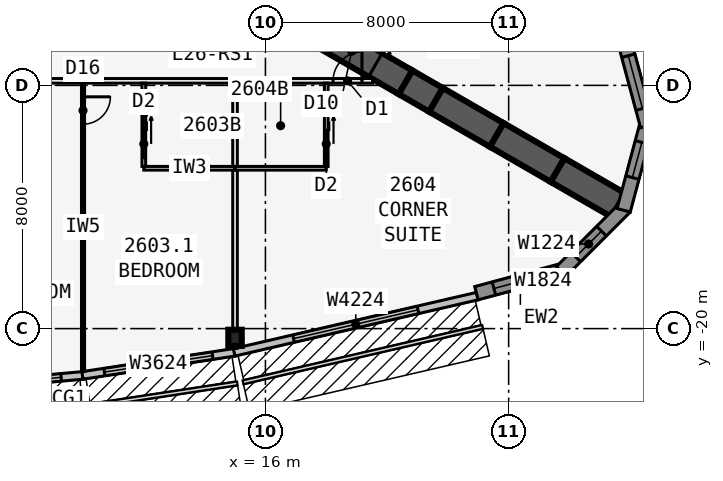
"""IFC4 building model, lengths in metres.
Left out: names, types, materials, properties, quantities, classifications, styles, units other than length and angle.
Written with IfcOpenShell. Run it as: python <this file> out.ifc"""

import sys

from ifc_helpers import new_model, si_unit, direction, frame, frame_2d, origin, origin_2d, place, context, subcontext, project, spatial, polyline, rectangle, i_section, outline, extrude, element, fill, save


model = new_model("IFC4")
c1 = context("Model", 3, precision=1e-05, world=origin(), true_north=direction((0.0, 1.0)))
c2 = subcontext(c1, "Body", "Model", "MODEL_VIEW")
j1 = project(units=[si_unit("LENGTHUNIT", "METRE"), si_unit("PLANEANGLEUNIT", "RADIAN")], contexts=[c1])
p1 = place(None, origin())
s1 = spatial("IfcSite", under=j1, at=p1, CompositionType="ELEMENT")
p2 = place(p1, origin())
s2 = spatial("IfcBuilding", under=s1, at=p2, CompositionType="ELEMENT")
p3 = place(p2, frame((0.0, 0.0, 99.9)))
s3 = spatial("IfcBuildingStorey", under=s2, at=p3, CompositionType="ELEMENT", Elevation=99.9)
p4 = place(p3, frame((16.5, -9.526, 0.0), z_axis=(0.0, 0.0, 1.0), x_axis=(0.866031398331, -0.499989616998, 0.0)))
e1 = element("IfcWall", 1, at=p4, inside=s3, PredefinedType="SHEAR", context=c2, shape_type="SweptSolid", body=[
    extrude(rectangle(XDim=4.746, YDim=0.9, at=frame_2d((2.373, 0.0))), origin(), (0.0, 0.0, 1.0), 3.4),
])
p5 = place(p4, frame((1.8, 0.0, 0.0)))
e2 = element("IfcOpeningElement", 2, at=p5, cuts=e1, PredefinedType="OPENING", context=c2, shape_type="SweptSolid", body=[
    extrude(rectangle(XDim=1.8, YDim=2.13, at=frame_2d((0.9, 1.065))), frame((0.0, 0.46, 0.0), z_axis=(0.0, -1.0, 0.0), x_axis=(1.0, 0.0, 0.0)), (0.0, 0.0, 1.0), 0.92),
])
p6 = place(p3, frame((20.61, -11.899, 0.0), z_axis=(0.0, 0.0, 1.0), x_axis=(0.866009537788, -0.500027479704, 0.0)))
e3 = element("IfcWall", 3, at=p6, inside=s3, PredefinedType="SHEAR", context=c2, shape_type="SweptSolid", body=[
    extrude(rectangle(XDim=1.155, YDim=0.9, at=frame_2d((0.577, 0.0))), origin(), (0.0, 0.0, 1.0), 3.4),
])
for number, where, z_axis, x_axis in (
    (4, (21.61, -12.477, 0.0), (0.0, 0.0, 1.0), (0.866, -0.5, 0.0)),
    (5, (23.61, -13.631, 0.0), (0.0, 0.0, 1.0), (0.866, -0.5, 0.0)),
    (6, (25.61, -14.786, 0.0), (0.0, 0.0, 1.0), (0.866, -0.5, 0.0)),
):
    element("IfcWall", number, at=place(p3, frame(where, z_axis=z_axis, x_axis=x_axis)), inside=s3, PredefinedType="SHEAR", context=c2, shape_type="SweptSolid", body=[
        extrude(rectangle(XDim=2.309, YDim=0.9, at=frame_2d((1.155, 0.0))), origin(), (0.0, 0.0, 1.0), 3.4),
    ])
p7 = place(p3, frame((15.0, -20.303, 0.0), z_axis=(0.0, 0.0, 1.0), x_axis=(1.0, 0.0, 0.0)))
e7 = element("IfcColumn", 7, at=p7, inside=s3, PredefinedType="COLUMN", context=c2, shape_type="SweptSolid", body=[
    extrude(i_section(OverallWidth=0.442, OverallDepth=0.531, WebThickness=0.066, FlangeThickness=0.106, at=origin_2d()), origin(), (0.0, 0.0, 1.0), 3.4),
])
p8 = place(p3, frame((4.989, -21.996, 0.0), z_axis=(0.0, 0.0, 1.0), x_axis=(0.995857256774, 0.090930325692, 0.0)))
e8 = element("IfcWall", 8, at=p8, inside=s3, PredefinedType="STANDARD", context=c2, shape_type="SweptSolid", body=[
    extrude(rectangle(XDim=5.021, YDim=0.25, at=frame_2d((2.51, 0.0))), origin(), (0.0, 0.0, 1.0), 3.15),
])
p9 = place(p8, frame((0.71, 0.0, 0.45)))
e9 = element("IfcOpeningElement", 9, at=p9, cuts=e8, PredefinedType="OPENING", context=c2, shape_type="SweptSolid", body=[
    extrude(rectangle(XDim=3.6, YDim=2.4, at=frame_2d((1.8, 1.2))), frame((0.0, 0.135, 0.0), z_axis=(0.0, -1.0, 0.0), x_axis=(1.0, 0.0, 0.0)), (0.0, 0.0, 1.0), 0.27),
])
p10 = place(p3, frame((9.981, -21.54, 0.0), z_axis=(0.0, 0.0, 1.0), x_axis=(0.988615403399, 0.150464561152, 0.0)))
e10 = element("IfcWall", 10, at=p10, inside=s3, PredefinedType="STANDARD", context=c2, shape_type="SweptSolid", body=[
    extrude(rectangle(XDim=5.058, YDim=0.25, at=frame_2d((2.529, 0.0))), origin(), (0.0, 0.0, 1.0), 3.15),
])
p11 = place(p10, frame((0.729, 0.0, 0.45)))
e11 = element("IfcOpeningElement", 11, at=p11, cuts=e10, PredefinedType="OPENING", context=c2, shape_type="SweptSolid", body=[
    extrude(rectangle(XDim=3.6, YDim=2.4, at=frame_2d((1.8, 1.2))), frame((0.0, 0.135, 0.0), z_axis=(0.0, -1.0, 0.0), x_axis=(1.0, 0.0, 0.0)), (0.0, 0.0, 1.0), 0.27),
])
p12 = place(p3, frame((14.972, -20.781, 0.0), z_axis=(0.0, 0.0, 1.0), x_axis=(0.974279327392, 0.225343720163, 0.0)))
e12 = element("IfcWall", 12, at=p12, inside=s3, PredefinedType="STANDARD", context=c2, shape_type="SweptSolid", body=[
    extrude(rectangle(XDim=8.211, YDim=0.25, at=frame_2d((4.105, 0.0))), origin(), (0.0, 0.0, 1.0), 3.15),
])
p13 = place(p12, frame((2.006, 0.0, 0.45)))
e13 = element("IfcOpeningElement", 13, at=p13, cuts=e12, PredefinedType="OPENING", context=c2, shape_type="SweptSolid", body=[
    extrude(rectangle(XDim=4.2, YDim=2.4, at=frame_2d((2.1, 1.2))), frame((0.0, 0.135, 0.0), z_axis=(0.0, -1.0, 0.0), x_axis=(1.0, 0.0, 0.0)), (0.0, 0.0, 1.0), 0.27),
])
p14 = place(p3, frame((22.942, -18.835, 0.0), z_axis=(0.0, 0.0, 1.0), x_axis=(0.965930548995, 0.258801419081, 0.0)))
e14 = element("IfcWall", 14, at=p14, inside=s3, PredefinedType="SOLIDWALL", context=c2, shape_type="SweptSolid", body=[
    extrude(rectangle(XDim=2.989, YDim=0.45, at=frame_2d((1.494, 0.0))), origin(), (0.0, 0.0, 1.0), 3.15),
])
p15 = place(p14, frame((0.594, 0.0, 0.45)))
e15 = element("IfcOpeningElement", 15, at=p15, cuts=e14, PredefinedType="OPENING", context=c2, shape_type="SweptSolid", body=[
    extrude(rectangle(XDim=1.8, YDim=2.4, at=frame_2d((0.9, 1.2))), frame((0.0, 0.235, 0.0), z_axis=(0.0, -1.0, 0.0), x_axis=(1.0, 0.0, 0.0)), (0.0, 0.0, 1.0), 0.47),
])
p16 = place(p3, frame((25.728, -18.12, 0.0), z_axis=(0.0, 0.0, 1.0), x_axis=(0.707025086683, 0.707188466253, 0.0)))
e16 = element("IfcWall", 16, at=p16, inside=s3, PredefinedType="SOLIDWALL", context=c2, shape_type="SweptSolid", body=[
    extrude(outline(polyline([(2.989, 0.225), (2.93, 0.225), (2.438, 0.093), (2.402, 0.225), (0.0, 0.225), (0.0, -0.225), (2.989, -0.225), (2.989, 0.225)])), origin(), (0.0, 0.0, 1.0), 3.15),
])
p17 = place(p16, frame((0.676, 0.0, 0.45)))
e17 = element("IfcOpeningElement", 17, at=p17, cuts=e16, PredefinedType="OPENING", context=c2, shape_type="SweptSolid", body=[
    extrude(rectangle(XDim=1.2, YDim=2.4, at=frame_2d((0.6, 1.2))), frame((0.0, 0.235, 0.0), z_axis=(0.0, -1.0, 0.0), x_axis=(1.0, 0.0, 0.0)), (0.0, 0.0, 1.0), 0.47),
])
p18 = place(p3, frame((27.783, -16.108, 0.0), z_axis=(0.0, 0.0, 1.0), x_axis=(0.258801419081, 0.965930548995, 0.0)))
e18 = element("IfcWall", 18, at=p18, inside=s3, PredefinedType="SOLIDWALL", context=c2, shape_type="SweptSolid", body=[
    extrude(outline(polyline([(2.989, 0.225), (0.586, 0.225), (0.551, 0.093), (0.06, 0.225), (0.0, 0.225), (0.0, -0.225), (2.989, -0.225), (2.989, 0.225)])), origin(), (0.0, 0.0, 1.0), 3.15),
])
p19 = place(p18, frame((1.113, 0.0, 0.45)))
e19 = element("IfcOpeningElement", 19, at=p19, cuts=e18, PredefinedType="OPENING", context=c2, shape_type="SweptSolid", body=[
    extrude(rectangle(XDim=1.2, YDim=2.4, at=frame_2d((0.6, 1.2))), frame((0.0, 0.235, 0.0), z_axis=(0.0, -1.0, 0.0), x_axis=(1.0, 0.0, 0.0)), (0.0, 0.0, 1.0), 0.47),
])
p20 = place(p3, frame((28.556, -13.337, 0.0), z_axis=(0.0, 0.0, 1.0), x_axis=(-0.258780998834, 0.965936019953, 0.0)))
e20 = element("IfcWall", 20, at=p20, inside=s3, PredefinedType="SOLIDWALL", context=c2, shape_type="SweptSolid", body=[
    extrude(rectangle(XDim=2.989, YDim=0.45, at=frame_2d((1.494, 0.0))), origin(), (0.0, 0.0, 1.0), 3.15),
])
p21 = place(p20, frame((0.594, 0.0, 0.45)))
e21 = element("IfcOpeningElement", 21, at=p21, cuts=e20, PredefinedType="OPENING", context=c2, shape_type="SweptSolid", body=[
    extrude(rectangle(XDim=1.8, YDim=2.4, at=frame_2d((0.9, 1.2))), frame((0.0, 0.235, 0.0), z_axis=(0.0, -1.0, 0.0), x_axis=(1.0, 0.0, 0.0)), (0.0, 0.0, 1.0), 0.47),
])
p22 = place(p3, frame((-19.527, -11.851, 0.0), z_axis=(0.0, 0.0, 1.0), x_axis=(1.0, 0.0, 0.0)))
e22 = element("IfcWall", 22, at=p22, inside=s3, PredefinedType="PARTITIONING", context=c2, shape_type="SweptSolid", body=[
    extrude(rectangle(XDim=39.054, YDim=0.15, at=frame_2d((19.527, 0.0))), origin(), (0.0, 0.0, 1.0), 3.15),
])
p23 = place(p22, frame((1.558, 0.0, 0.0)))
e23 = element("IfcOpeningElement", 23, at=p23, cuts=e22, PredefinedType="OPENING", context=c2, shape_type="SweptSolid", body=[
    extrude(rectangle(XDim=0.95, YDim=2.13, at=frame_2d((0.475, 1.065))), frame((0.0, 0.085, 0.0), z_axis=(0.0, -1.0, 0.0), x_axis=(1.0, 0.0, 0.0)), (0.0, 0.0, 1.0), 0.17),
])
p24 = place(p22, frame((11.552, 0.0, 0.0)))
e24 = element("IfcOpeningElement", 24, at=p24, cuts=e22, PredefinedType="OPENING", context=c2, shape_type="SweptSolid", body=[
    extrude(rectangle(XDim=0.95, YDim=2.13, at=frame_2d((0.475, 1.065))), frame((0.0, 0.085, 0.0), z_axis=(0.0, -1.0, 0.0), x_axis=(1.0, 0.0, 0.0)), (0.0, 0.0, 1.0), 0.17),
])
p25 = place(p22, frame((21.527, 0.0, 0.0)))
e25 = element("IfcOpeningElement", 25, at=p25, cuts=e22, PredefinedType="OPENING", context=c2, shape_type="SweptSolid", body=[
    extrude(rectangle(XDim=1.0, YDim=2.13, at=frame_2d((0.5, 1.065))), frame((0.0, 0.085, 0.0), z_axis=(0.0, -1.0, 0.0), x_axis=(1.0, 0.0, 0.0)), (0.0, 0.0, 1.0), 0.17),
])
p26 = place(p22, frame((26.552, 0.0, 0.0)))
e26 = element("IfcOpeningElement", 26, at=p26, cuts=e22, PredefinedType="OPENING", context=c2, shape_type="SweptSolid", body=[
    extrude(rectangle(XDim=0.95, YDim=2.13, at=frame_2d((0.475, 1.065))), frame((0.0, 0.085, 0.0), z_axis=(0.0, -1.0, 0.0), x_axis=(1.0, 0.0, 0.0)), (0.0, 0.0, 1.0), 0.17),
])
p27 = place(p22, frame((37.752, 0.0, 0.0)))
e27 = element("IfcOpeningElement", 27, at=p27, cuts=e22, PredefinedType="OPENING", context=c2, shape_type="SweptSolid", body=[
    extrude(rectangle(XDim=0.95, YDim=2.13, at=frame_2d((0.475, 1.065))), frame((0.0, 0.085, 0.0), z_axis=(0.0, -1.0, 0.0), x_axis=(1.0, 0.0, 0.0)), (0.0, 0.0, 1.0), 0.17),
])
p28 = place(p3, frame((10.0, -11.926, 0.0), z_axis=(0.0, 0.0, 1.0), x_axis=(0.0, -1.0, 0.0)))
e28 = element("IfcWall", 28, at=p28, inside=s3, PredefinedType="PARTITIONING", context=c2, shape_type="SweptSolid", body=[
    extrude(rectangle(XDim=9.485, YDim=0.1, at=frame_2d((4.742, 0.0))), origin(), (0.0, 0.0, 1.0), 2.109),
])
p29 = place(p28, frame((0.45, 0.0, 0.0)))
e29 = element("IfcOpeningElement", 29, at=p29, cuts=e28, PredefinedType="OPENING", context=c2, shape_type="SweptSolid", body=[
    extrude(rectangle(XDim=0.9, YDim=2.032, at=frame_2d((0.45, 1.016))), frame((0.0, 0.06, 0.0), z_axis=(0.0, -1.0, 0.0), x_axis=(1.0, 0.0, 0.0)), (0.0, 0.0, 1.0), 0.12),
])
p30 = place(p3, frame((15.0, -11.926, 0.0), z_axis=(0.0, 0.0, 1.0), x_axis=(0.0, -1.0, 0.0)))
e30 = element("IfcWall", 30, at=p30, inside=s3, PredefinedType="PARTITIONING", context=c2, shape_type="SweptSolid", body=[
    extrude(rectangle(XDim=8.72, YDim=0.15, at=frame_2d((4.36, 0.0))), origin(), (0.0, 0.0, 1.0), 2.05),
])
p31 = place(p3, frame((12.0, -14.726, 0.0), z_axis=(0.0, 0.0, 1.0), x_axis=(1.0, 0.0, 0.0)))
e31 = element("IfcWall", 31, at=p31, inside=s3, PredefinedType="PLUMBINGWALL", context=c2, shape_type="SweptSolid", body=[
    extrude(rectangle(XDim=3.0, YDim=0.12, at=frame_2d((1.5, 0.0))), origin(), (0.0, 0.0, 1.0), 3.15),
])
p32 = place(p3, frame((12.0, -11.926, 0.0), z_axis=(0.0, 0.0, 1.0), x_axis=(0.0, -1.0, 0.0)))
e32 = element("IfcWall", 32, at=p32, inside=s3, PredefinedType="PLUMBINGWALL", context=c2, shape_type="SweptSolid", body=[
    extrude(rectangle(XDim=2.74, YDim=0.12, at=frame_2d((1.37, 0.0))), origin(), (0.0, 0.0, 1.0), 3.15),
])
p33 = place(p32, frame((1.55, 0.0, 0.0)))
e33 = element("IfcOpeningElement", 33, at=p33, cuts=e32, PredefinedType="OPENING", context=c2, shape_type="SweptSolid", body=[
    extrude(rectangle(XDim=0.9, YDim=2.13, at=frame_2d((0.45, 1.065))), frame((0.0, 0.07, 0.0), z_axis=(0.0, -1.0, 0.0), x_axis=(1.0, 0.0, 0.0)), (0.0, 0.0, 1.0), 0.14),
])
p34 = place(p3, frame((15.0, -14.726, 0.0), z_axis=(0.0, 0.0, 1.0), x_axis=(1.0, 0.0, 0.0)))
e34 = element("IfcWall", 34, at=p34, inside=s3, PredefinedType="PLUMBINGWALL", context=c2, shape_type="SweptSolid", body=[
    extrude(rectangle(XDim=3.0, YDim=0.12, at=frame_2d((1.5, 0.0))), origin(), (0.0, 0.0, 1.0), 3.15),
])
p35 = place(p3, frame((18.0, -11.926, 0.0), z_axis=(0.0, 0.0, 1.0), x_axis=(0.0, -1.0, 0.0)))
e35 = element("IfcWall", 35, at=p35, inside=s3, PredefinedType="PLUMBINGWALL", context=c2, shape_type="SweptSolid", body=[
    extrude(rectangle(XDim=2.74, YDim=0.12, at=frame_2d((1.37, 0.0))), origin(), (0.0, 0.0, 1.0), 3.15),
])
p36 = place(p35, frame((1.55, 0.0, 0.0)))
e36 = element("IfcOpeningElement", 36, at=p36, cuts=e35, PredefinedType="OPENING", context=c2, shape_type="SweptSolid", body=[
    extrude(rectangle(XDim=0.9, YDim=2.13, at=frame_2d((0.45, 1.065))), frame((0.0, 0.07, 0.0), z_axis=(0.0, -1.0, 0.0), x_axis=(1.0, 0.0, 0.0)), (0.0, 0.0, 1.0), 0.14),
])
p37 = place(p3, frame((20.027, -10.985, 0.0), z_axis=(0.0, 0.0, 1.0), x_axis=(-0.500001677587, 0.866024435227, 0.0)))
e37 = element("IfcWall", 37, at=p37, inside=s3, PredefinedType="PARTITIONING", context=c2, shape_type="SweptSolid", body=[
    extrude(rectangle(XDim=39.054, YDim=0.15, at=frame_2d((19.527, 0.0))), origin(), (0.0, 0.0, 1.0), 3.15),
])
p38 = place(p37, frame((1.558, 0.0, 0.0)))
e38 = element("IfcOpeningElement", 38, at=p38, cuts=e37, PredefinedType="OPENING", context=c2, shape_type="SweptSolid", body=[
    extrude(rectangle(XDim=0.95, YDim=2.13, at=frame_2d((0.475, 1.065))), frame((0.0, 0.085, 0.0), z_axis=(0.0, -1.0, 0.0), x_axis=(1.0, 0.0, 0.0)), (0.0, 0.0, 1.0), 0.17),
])
p39 = place(p37, frame((11.552, 0.0, 0.0)))
e39 = element("IfcOpeningElement", 39, at=p39, cuts=e37, PredefinedType="OPENING", context=c2, shape_type="SweptSolid", body=[
    extrude(rectangle(XDim=0.95, YDim=2.13, at=frame_2d((0.475, 1.065))), frame((0.0, 0.085, 0.0), z_axis=(0.0, -1.0, 0.0), x_axis=(1.0, 0.0, 0.0)), (0.0, 0.0, 1.0), 0.17),
])
p40 = place(p37, frame((22.752, 0.0, 0.0)))
e40 = element("IfcOpeningElement", 40, at=p40, cuts=e37, PredefinedType="OPENING", context=c2, shape_type="SweptSolid", body=[
    extrude(rectangle(XDim=0.95, YDim=2.13, at=frame_2d((0.475, 1.065))), frame((0.0, 0.085, 0.0), z_axis=(0.0, -1.0, 0.0), x_axis=(1.0, 0.0, 0.0)), (0.0, 0.0, 1.0), 0.17),
])
p41 = place(p37, frame((36.546, 0.0, 0.0)))
e41 = element("IfcOpeningElement", 41, at=p41, cuts=e37, PredefinedType="OPENING", context=c2, shape_type="SweptSolid", body=[
    extrude(rectangle(XDim=0.95, YDim=2.13, at=frame_2d((0.475, 1.065))), frame((0.0, 0.085, 0.0), z_axis=(0.0, -1.0, 0.0), x_axis=(1.0, 0.0, 0.0)), (0.0, 0.0, 1.0), 0.17),
])
p42 = place(p9, origin())
e42 = element("IfcWindow", 42, at=p42, inside=s3, PartitioningType="SINGLE_PANEL", PredefinedType="WINDOW", context=c2, shape_type="SweptSolid", body=[
    extrude(rectangle(XDim=3.6, YDim=2.4, at=frame_2d((1.8, 1.2))), frame((0.0, 0.03, 0.0), z_axis=(0.0, -1.0, 0.0), x_axis=(1.0, 0.0, 0.0)), (0.0, 0.0, 1.0), 0.06),
])
fill(e9, e42)
p43 = place(p11, origin())
e43 = element("IfcWindow", 43, at=p43, inside=s3, PartitioningType="SINGLE_PANEL", PredefinedType="WINDOW", context=c2, shape_type="SweptSolid", body=[
    extrude(rectangle(XDim=3.6, YDim=2.4, at=frame_2d((1.8, 1.2))), frame((0.0, 0.03, 0.0), z_axis=(0.0, -1.0, 0.0), x_axis=(1.0, 0.0, 0.0)), (0.0, 0.0, 1.0), 0.06),
])
fill(e11, e43)
p44 = place(p13, origin())
e44 = element("IfcWindow", 44, at=p44, inside=s3, PartitioningType="SINGLE_PANEL", PredefinedType="WINDOW", context=c2, shape_type="SweptSolid", body=[
    extrude(rectangle(XDim=4.2, YDim=2.4, at=frame_2d((2.1, 1.2))), frame((0.0, 0.03, 0.0), z_axis=(0.0, -1.0, 0.0), x_axis=(1.0, 0.0, 0.0)), (0.0, 0.0, 1.0), 0.06),
])
fill(e13, e44)
p45 = place(p15, origin())
e45 = element("IfcWindow", 45, at=p45, inside=s3, PartitioningType="SINGLE_PANEL", PredefinedType="WINDOW", context=c2, shape_type="SweptSolid", body=[
    extrude(rectangle(XDim=1.8, YDim=2.4, at=frame_2d((0.9, 1.2))), frame((0.0, 0.03, 0.0), z_axis=(0.0, -1.0, 0.0), x_axis=(1.0, 0.0, 0.0)), (0.0, 0.0, 1.0), 0.06),
])
fill(e15, e45)
p46 = place(p17, origin())
e46 = element("IfcWindow", 46, at=p46, inside=s3, PartitioningType="SINGLE_PANEL", PredefinedType="WINDOW", context=c2, shape_type="SweptSolid", body=[
    extrude(rectangle(XDim=1.2, YDim=2.4, at=frame_2d((0.6, 1.2))), frame((0.0, 0.03, 0.0), z_axis=(0.0, -1.0, 0.0), x_axis=(1.0, 0.0, 0.0)), (0.0, 0.0, 1.0), 0.06),
])
fill(e17, e46)
p47 = place(p19, origin())
e47 = element("IfcWindow", 47, at=p47, inside=s3, PartitioningType="SINGLE_PANEL", PredefinedType="WINDOW", context=c2, shape_type="SweptSolid", body=[
    extrude(rectangle(XDim=1.2, YDim=2.4, at=frame_2d((0.6, 1.2))), frame((0.0, 0.03, 0.0), z_axis=(0.0, -1.0, 0.0), x_axis=(1.0, 0.0, 0.0)), (0.0, 0.0, 1.0), 0.06),
])
fill(e19, e47)
p48 = place(p21, origin())
e48 = element("IfcWindow", 48, at=p48, inside=s3, PartitioningType="SINGLE_PANEL", PredefinedType="WINDOW", context=c2, shape_type="SweptSolid", body=[
    extrude(rectangle(XDim=1.8, YDim=2.4, at=frame_2d((0.9, 1.2))), frame((0.0, 0.03, 0.0), z_axis=(0.0, -1.0, 0.0), x_axis=(1.0, 0.0, 0.0)), (0.0, 0.0, 1.0), 0.06),
])
fill(e21, e48)
p49 = place(p29, origin())
e49 = element("IfcDoor", 49, at=p49, inside=s3, OperationType="SINGLE_SWING_LEFT", PredefinedType="DOOR", context=c2, shape_type="SweptSolid", body=[
    extrude(rectangle(XDim=0.9, YDim=2.032, at=frame_2d((0.45, 1.016))), frame((0.0, 0.025, 0.0), z_axis=(0.0, -1.0, 0.0), x_axis=(1.0, 0.0, 0.0)), (0.0, 0.0, 1.0), 0.05),
])
fill(e29, e49)
p50 = place(p33, origin())
e50 = element("IfcDoor", 50, at=p50, inside=s3, OperationType="SLIDING_TO_LEFT", PredefinedType="DOOR", context=c2, shape_type="SweptSolid", body=[
    extrude(rectangle(XDim=0.9, YDim=2.13, at=frame_2d((0.45, 1.065))), frame((0.0, 0.025, 0.0), z_axis=(0.0, -1.0, 0.0), x_axis=(1.0, 0.0, 0.0)), (0.0, 0.0, 1.0), 0.05),
])
fill(e33, e50)
p51 = place(p36, origin())
e51 = element("IfcDoor", 51, at=p51, inside=s3, OperationType="SLIDING_TO_LEFT", PredefinedType="DOOR", context=c2, shape_type="SweptSolid", body=[
    extrude(rectangle(XDim=0.9, YDim=2.13, at=frame_2d((0.45, 1.065))), frame((0.0, 0.025, 0.0), z_axis=(0.0, -1.0, 0.0), x_axis=(1.0, 0.0, 0.0)), (0.0, 0.0, 1.0), 0.05),
])
fill(e36, e51)
p52 = place(p27, origin())
e52 = element("IfcDoor", 52, at=p52, inside=s3, OperationType="SINGLE_SWING_RIGHT", PredefinedType="DOOR", context=c2, shape_type="SweptSolid", body=[
    extrude(rectangle(XDim=0.95, YDim=2.13, at=frame_2d((0.475, 1.065))), frame((0.0, 0.025, 0.0), z_axis=(0.0, -1.0, 0.0), x_axis=(1.0, 0.0, 0.0)), (0.0, 0.0, 1.0), 0.05),
])
fill(e27, e52)
p53 = place(p5, origin())
e53 = element("IfcDoor", 53, at=p53, inside=s3, OperationType="DOUBLE_DOOR_DOUBLE_SWING", PredefinedType="DOOR", context=c2, shape_type="SweptSolid", body=[
    extrude(rectangle(XDim=1.8, YDim=2.13, at=frame_2d((0.9, 1.065))), frame((0.0, 0.025, 0.0), z_axis=(0.0, -1.0, 0.0), x_axis=(1.0, 0.0, 0.0)), (0.0, 0.0, 1.0), 0.05),
])
fill(e2, e53)
save(model, sys.argv[1])
